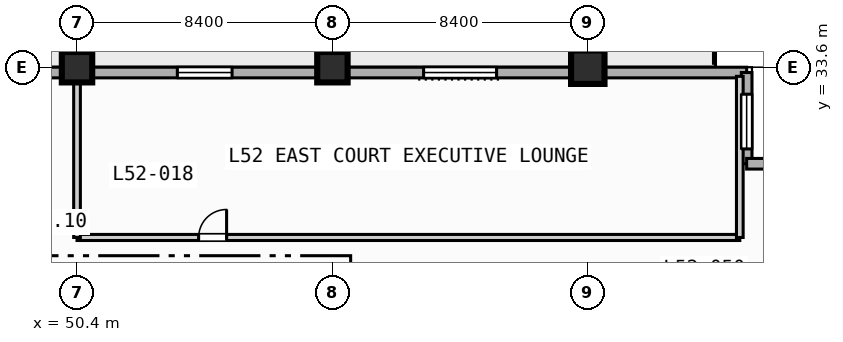
"""IFC4 building model, lengths in metres.
Left out: names, types, materials, properties, quantities, classifications, styles, units other than length and angle.
Written with IfcOpenShell. Run it as: python <this file> out.ifc"""

import sys

from ifc_helpers import new_model, si_unit, direction, frame, frame_2d, origin, origin_2d, place, context, subcontext, project, spatial, rectangle, extrude, element, fill, save


model = new_model("IFC4")
c1 = context("Model", 3, precision=1e-05, world=origin(), true_north=direction((0.0, 1.0)))
c2 = subcontext(c1, "Body", "Model", "MODEL_VIEW")
j1 = project(units=[si_unit("LENGTHUNIT", "METRE"), si_unit("PLANEANGLEUNIT", "RADIAN")], contexts=[c1])
p1 = place(None, origin())
s1 = spatial("IfcSite", under=j1, at=p1, CompositionType="ELEMENT")
p2 = place(p1, origin())
s2 = spatial("IfcBuilding", under=s1, at=p2, CompositionType="ELEMENT")
p3 = place(p2, frame((0.0, 0.0, 212.4)))
s3 = spatial("IfcBuildingStorey", under=s2, at=p3, CompositionType="ELEMENT", Elevation=212.4)
for number, where, z_axis, x_axis in (
    (1, (50.4, 33.6, 0.0), (0.0, 0.0, 1.0), (1.0, 0.0, 0.0)),
    (2, (58.8, 33.6, 0.0), (0.0, 0.0, 1.0), (1.0, 0.0, 0.0)),
):
    element("IfcColumn", number, at=place(p3, frame(where, z_axis=z_axis, x_axis=x_axis)), inside=s3, PredefinedType="COLUMN", context=c2, shape_type="SweptSolid", body=[
        extrude(rectangle(XDim=1.0, YDim=1.0, at=origin_2d()), origin(), (0.0, 0.0, 1.0), 3.7),
    ])
p4 = place(p3, frame((67.2, 33.6, 0.0), z_axis=(0.0, 0.0, 1.0), x_axis=(1.0, 0.0, 0.0)))
e3 = element("IfcColumn", 3, at=p4, inside=s3, PredefinedType="COLUMN", context=c2, shape_type="SweptSolid", body=[
    extrude(rectangle(XDim=1.1, YDim=1.1, at=origin_2d()), origin(), (0.0, 0.0, 1.0), 3.7),
])
p5 = place(p3, frame((33.425, 33.425, 0.0), z_axis=(0.0, 0.0, 1.0), x_axis=(1.0, 0.0, 0.0)))
e4 = element("IfcWall", 4, at=p5, inside=s3, PredefinedType="STANDARD", context=c2, shape_type="SweptSolid", body=[
    extrude(rectangle(XDim=39.0, YDim=0.35, at=frame_2d((19.5, 0.0))), origin(), (0.0, 0.0, 1.0), 3.47),
])
p6 = place(p5, frame((12.075, 0.0, 0.0)))
e5 = element("IfcOpeningElement", 5, at=p6, cuts=e4, PredefinedType="OPENING", context=c2, shape_type="SweptSolid", body=[
    extrude(rectangle(XDim=1.4, YDim=2.2, at=frame_2d((0.7, 1.1))), frame((0.0, 0.185, 0.0), z_axis=(0.0, -1.0, 0.0), x_axis=(1.0, 0.0, 0.0)), (0.0, 0.0, 1.0), 0.37),
])
p7 = place(p5, frame((20.275, 0.0, 0.85)))
e6 = element("IfcOpeningElement", 6, at=p7, cuts=e4, PredefinedType="OPENING", context=c2, shape_type="SweptSolid", body=[
    extrude(rectangle(XDim=1.8, YDim=1.8, at=frame_2d((0.9, 0.9))), frame((0.0, 0.185, 0.0), z_axis=(0.0, -1.0, 0.0), x_axis=(1.0, 0.0, 0.0)), (0.0, 0.0, 1.0), 0.37),
])
p8 = place(p5, frame((28.375, 0.0, 0.85)))
e7 = element("IfcOpeningElement", 7, at=p8, cuts=e4, PredefinedType="OPENING", context=c2, shape_type="SweptSolid", body=[
    extrude(rectangle(XDim=2.4, YDim=1.95, at=frame_2d((1.2, 0.975))), frame((0.0, 0.185, 0.0), z_axis=(0.0, -1.0, 0.0), x_axis=(1.0, 0.0, 0.0)), (0.0, 0.0, 1.0), 0.37),
])
p9 = place(p3, frame((72.425, 33.425, 0.0), z_axis=(0.0, 0.0, 1.0), x_axis=(0.0, -1.0, 0.0)))
e8 = element("IfcWall", 8, at=p9, inside=s3, PredefinedType="STANDARD", context=c2, shape_type="SweptSolid", body=[
    extrude(rectangle(XDim=3.0, YDim=0.35, at=frame_2d((1.5, 0.0))), origin(), (0.0, 0.0, 1.0), 3.47),
])
p10 = place(p9, frame((0.712, 0.0, 0.85)))
e9 = element("IfcOpeningElement", 9, at=p10, cuts=e8, PredefinedType="OPENING", context=c2, shape_type="SweptSolid", body=[
    extrude(rectangle(XDim=1.8, YDim=1.8, at=frame_2d((0.9, 0.9))), frame((0.0, 0.185, 0.0), z_axis=(0.0, -1.0, 0.0), x_axis=(1.0, 0.0, 0.0)), (0.0, 0.0, 1.0), 0.37),
])
p11 = place(p3, frame((72.425, 30.425, 0.0), z_axis=(0.0, 0.0, 1.0), x_axis=(1.0, 0.0, 0.0)))
e10 = element("IfcWall", 10, at=p11, inside=s3, PredefinedType="STANDARD", context=c2, shape_type="SweptSolid", body=[
    extrude(rectangle(XDim=3.0, YDim=0.35, at=frame_2d((1.5, 0.0))), origin(), (0.0, 0.0, 1.0), 3.47),
])
p12 = place(p3, frame((50.4, 28.0, 0.0), z_axis=(0.0, 0.0, 1.0), x_axis=(1.0, 0.0, 0.0)))
e11 = element("IfcWall", 11, at=p12, inside=s3, PredefinedType="PARTITIONING", context=c2, shape_type="SweptSolid", body=[
    extrude(rectangle(XDim=21.8, YDim=0.2, at=frame_2d((10.9, 0.0))), origin(), (0.0, 0.0, 1.0), 3.47),
])
p13 = place(p12, frame((4.0, 0.0, 0.0)))
e12 = element("IfcOpeningElement", 12, at=p13, cuts=e11, PredefinedType="OPENING", context=c2, shape_type="SweptSolid", body=[
    extrude(rectangle(XDim=0.92, YDim=2.1, at=frame_2d((0.46, 1.05))), frame((0.0, 0.11, 0.0), z_axis=(0.0, -1.0, 0.0), x_axis=(1.0, 0.0, 0.0)), (0.0, 0.0, 1.0), 0.22),
])
p14 = place(p3, frame((50.4, 28.0, 0.0), z_axis=(0.0, 0.0, 1.0), x_axis=(0.0, 1.0, 0.0)))
e13 = element("IfcWall", 13, at=p14, inside=s3, PredefinedType="PARTITIONING", context=c2, shape_type="SweptSolid", body=[
    extrude(rectangle(XDim=5.3, YDim=0.22, at=frame_2d((2.65, 0.0))), origin(), (0.0, 0.0, 1.0), 2.82),
])
p15 = place(p3, frame((72.2, 28.0, 0.0), z_axis=(0.0, 0.0, 1.0), x_axis=(0.0, 1.0, 0.0)))
e14 = element("IfcWall", 14, at=p15, inside=s3, PredefinedType="PARTITIONING", context=c2, shape_type="SweptSolid", body=[
    extrude(rectangle(XDim=5.3, YDim=0.22, at=frame_2d((2.65, 0.0))), origin(), (0.0, 0.0, 1.0), 3.47),
])
p16 = place(p7, origin())
e15 = element("IfcWindow", 15, at=p16, inside=s3, PartitioningType="SINGLE_PANEL", PredefinedType="WINDOW", context=c2, shape_type="SweptSolid", body=[
    extrude(rectangle(XDim=1.8, YDim=1.8, at=frame_2d((0.9, 0.9))), frame((0.0, 0.03, 0.0), z_axis=(0.0, -1.0, 0.0), x_axis=(1.0, 0.0, 0.0)), (0.0, 0.0, 1.0), 0.06),
])
fill(e6, e15)
p17 = place(p8, origin())
e16 = element("IfcWindow", 16, at=p17, inside=s3, PartitioningType="SINGLE_PANEL", PredefinedType="WINDOW", context=c2, shape_type="SweptSolid", body=[
    extrude(rectangle(XDim=2.4, YDim=1.95, at=frame_2d((1.2, 0.975))), frame((0.0, 0.03, 0.0), z_axis=(0.0, -1.0, 0.0), x_axis=(1.0, 0.0, 0.0)), (0.0, 0.0, 1.0), 0.06),
])
fill(e7, e16)
p18 = place(p10, origin())
e17 = element("IfcWindow", 17, at=p18, inside=s3, PartitioningType="SINGLE_PANEL", PredefinedType="WINDOW", context=c2, shape_type="SweptSolid", body=[
    extrude(rectangle(XDim=1.8, YDim=1.8, at=frame_2d((0.9, 0.9))), frame((0.0, 0.03, 0.0), z_axis=(0.0, -1.0, 0.0), x_axis=(1.0, 0.0, 0.0)), (0.0, 0.0, 1.0), 0.06),
])
fill(e9, e17)
p19 = place(p13, origin())
e18 = element("IfcDoor", 18, at=p19, inside=s3, OperationType="SINGLE_SWING_RIGHT", PredefinedType="DOOR", context=c2, shape_type="SweptSolid", body=[
    extrude(rectangle(XDim=0.92, YDim=2.1, at=frame_2d((0.46, 1.05))), frame((0.0, 0.025, 0.0), z_axis=(0.0, -1.0, 0.0), x_axis=(1.0, 0.0, 0.0)), (0.0, 0.0, 1.0), 0.05),
])
fill(e12, e18)
save(model, sys.argv[1])
